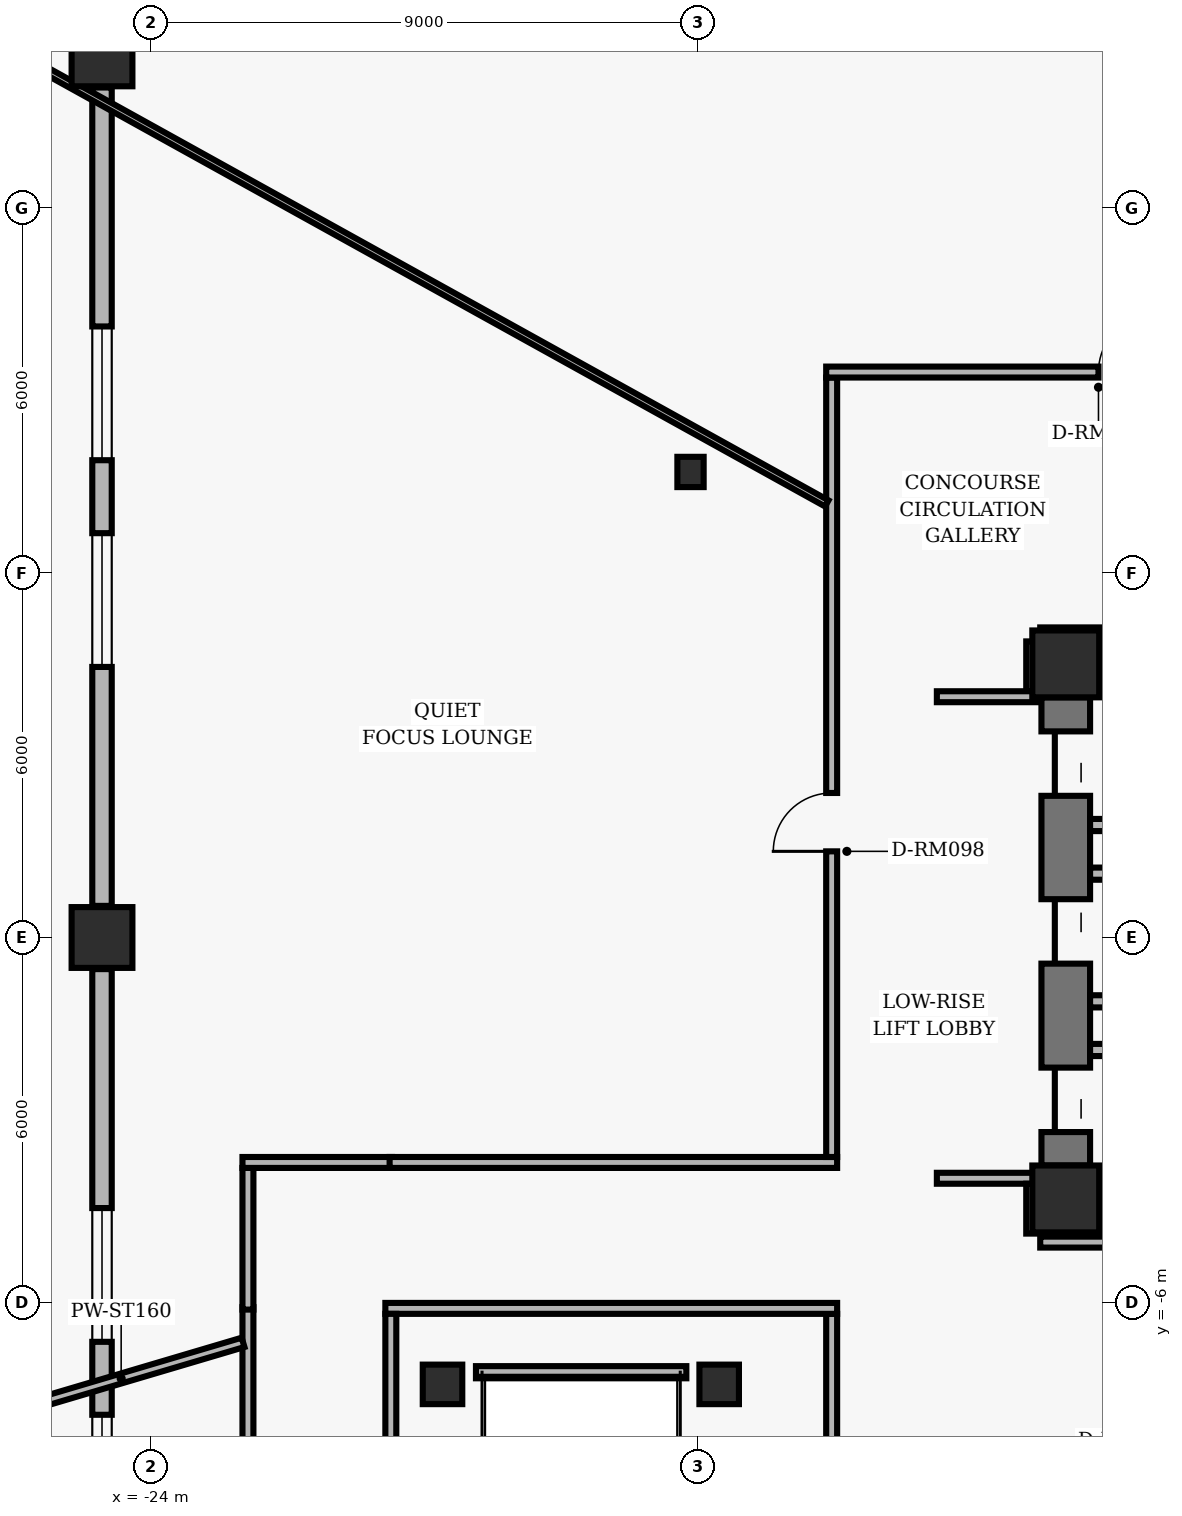
"""IFC4 building model, lengths in metres.
Left out: names, types, materials, properties, quantities, classifications, styles, units other than length and angle.
Written with IfcOpenShell. Run it as: python <this file> out.ifc"""

import sys

from ifc_helpers import new_model, si_unit, direction, frame, frame_2d, origin, origin_2d, place, context, subcontext, project, spatial, rectangle, hollow_rectangle, i_section, extrude, element, fill, save


model = new_model("IFC4")
c1 = context("Model", 3, precision=1e-05, world=origin(), true_north=direction((0.0, 1.0)))
c2 = subcontext(c1, "Body", "Model", "MODEL_VIEW")
j1 = project(units=[si_unit("LENGTHUNIT", "METRE"), si_unit("PLANEANGLEUNIT", "RADIAN")], contexts=[c1])
p1 = place(None, origin())
s1 = spatial("IfcSite", under=j1, at=p1, CompositionType="ELEMENT")
p2 = place(p1, origin())
s2 = spatial("IfcBuilding", under=s1, at=p2, CompositionType="ELEMENT")
p3 = place(p2, frame((0.0, 0.0, 15.36)))
s3 = spatial("IfcBuildingStorey", under=s2, at=p3, CompositionType="ELEMENT", Elevation=15.36)
for number, where, z_axis, x_axis in (
    (1, (-8.95, 4.5, 0.0), (0.0, 0.0, 1.0), (1.0, 0.0, 0.0)),
    (2, (-8.95, -4.3, 0.0), (0.0, 0.0, 1.0), (1.0, 0.0, 0.0)),
):
    element("IfcColumn", number, at=place(p3, frame(where, z_axis=z_axis, x_axis=x_axis)), inside=s3, PredefinedType="COLUMN", context=c2, shape_type="SweptSolid", body=[
        extrude(hollow_rectangle(XDim=1.1, YDim=1.1, WallThickness=0.07, InnerFilletRadius=0.02, OuterFilletRadius=0.04, at=origin_2d()), origin(), (0.0, 0.0, 1.0), 3.52),
    ])
p4 = place(p3, frame((-8.95, -3.75, 0.0), z_axis=(0.0, 0.0, 1.0), x_axis=(0.0, 1.0, 0.0)))
e3 = element("IfcWall", 3, at=p4, inside=s3, PredefinedType="SHEAR", context=c2, shape_type="SweptSolid", body=[
    extrude(rectangle(XDim=7.7, YDim=0.8, at=frame_2d((3.85, 0.0))), origin(), (0.0, 0.0, 1.0), 3.098),
])
p5 = place(p4, frame((0.55, 0.0, 0.0)))
e4 = element("IfcOpeningElement", 4, at=p5, cuts=e3, PredefinedType="OPENING", context=c2, shape_type="SweptSolid", body=[
    extrude(rectangle(XDim=1.06, YDim=2.04, at=frame_2d((0.53, 1.02))), frame((0.0, 0.41, 0.0), z_axis=(0.0, -1.0, 0.0), x_axis=(1.0, 0.0, 0.0)), (0.0, 0.0, 1.0), 0.82),
])
p6 = place(p4, frame((3.32, 0.0, 0.0)))
e5 = element("IfcOpeningElement", 5, at=p6, cuts=e3, PredefinedType="OPENING", context=c2, shape_type="SweptSolid", body=[
    extrude(rectangle(XDim=1.06, YDim=2.04, at=frame_2d((0.53, 1.02))), frame((0.0, 0.41, 0.0), z_axis=(0.0, -1.0, 0.0), x_axis=(1.0, 0.0, 0.0)), (0.0, 0.0, 1.0), 0.82),
])
p7 = place(p4, frame((6.08, 0.0, 0.0)))
e6 = element("IfcOpeningElement", 6, at=p7, cuts=e3, PredefinedType="OPENING", context=c2, shape_type="SweptSolid", body=[
    extrude(rectangle(XDim=1.06, YDim=2.04, at=frame_2d((0.53, 1.02))), frame((0.0, 0.41, 0.0), z_axis=(0.0, -1.0, 0.0), x_axis=(1.0, 0.0, 0.0)), (0.0, 0.0, 1.0), 0.82),
])
for number, where, z_axis, x_axis in (
    (7, (-8.4, 4.5, 0.0), (0.0, 0.0, 1.0), (1.0, 0.0, 0.0)),
    (8, (-8.4, -4.3, 0.0), (0.0, 0.0, 1.0), (1.0, 0.0, 0.0)),
):
    element("IfcWall", number, at=place(p3, frame(where, z_axis=z_axis, x_axis=x_axis)), inside=s3, PredefinedType="SHEAR", context=c2, shape_type="SweptSolid", body=[
        extrude(rectangle(XDim=1.8, YDim=0.4, at=frame_2d((0.9, 0.0))), origin(), (0.0, 0.0, 1.0), 3.098),
    ])
for number, where, z_axis, x_axis in (
    (9, (-24.8, 14.5, 0.0), (0.0, 0.0, 1.0), (1.0, 0.0, 0.0)),
    (10, (-24.8, 0.0, 0.0), (0.0, 0.0, 1.0), (1.0, 0.0, 0.0)),
):
    element("IfcColumn", number, at=place(p3, frame(where, z_axis=z_axis, x_axis=x_axis)), inside=s3, PredefinedType="COLUMN", context=c2, shape_type="SweptSolid", body=[
        extrude(rectangle(XDim=1.0, YDim=1.0, at=origin_2d()), origin(), (0.0, 0.0, 1.0), 3.52),
    ])
for number, where, z_axis, x_axis in (
    (11, (-19.2, -7.35, 0.0), (0.0, 0.0, 1.0), (1.0, 0.0, 0.0)),
    (12, (-14.65, -7.35, 0.0), (0.0, 0.0, 1.0), (1.0, 0.0, 0.0)),
):
    element("IfcColumn", number, at=place(p3, frame(where, z_axis=z_axis, x_axis=x_axis)), inside=s3, PredefinedType="COLUMN", context=c2, shape_type="SweptSolid", body=[
        extrude(rectangle(XDim=0.65, YDim=0.65, at=origin_2d()), origin(), (0.0, 0.0, 1.0), 3.52),
    ])
p8 = place(p3, frame((-15.121, 7.657, 0.0), z_axis=(0.0, 0.0, 1.0), x_axis=(1.0, 0.0, 0.0)))
e13 = element("IfcColumn", 13, at=p8, inside=s3, PredefinedType="COLUMN", context=c2, shape_type="SweptSolid", body=[
    extrude(i_section(OverallWidth=0.432, OverallDepth=0.498, WebThickness=0.056, FlangeThickness=0.089, FilletRadius=0.025, at=origin_2d()), origin(), (0.0, 0.0, 1.0), 3.52),
])
p9 = place(p3, frame((-24.8, 0.52, 0.0), z_axis=(0.0, 0.0, 1.0), x_axis=(0.0, 1.0, 0.0)))
e14 = element("IfcWall", 14, at=p9, inside=s3, PredefinedType="SOLIDWALL", context=c2, shape_type="SweptSolid", body=[
    extrude(rectangle(XDim=13.46, YDim=0.32, at=frame_2d((6.73, 0.0))), origin(), (0.0, 0.0, 1.0), 1.65),
])
p10 = place(p9, frame((3.93, 0.0, 0.4)))
e15 = element("IfcOpeningElement", 15, at=p10, cuts=e14, PredefinedType="OPENING", context=c2, shape_type="SweptSolid", body=[
    extrude(rectangle(XDim=2.2, YDim=1.1, at=frame_2d((1.1, 0.55))), frame((0.0, 0.17, 0.0), z_axis=(0.0, -1.0, 0.0), x_axis=(1.0, 0.0, 0.0)), (0.0, 0.0, 1.0), 0.34),
])
p11 = place(p9, frame((7.33, 0.0, 0.4)))
e16 = element("IfcOpeningElement", 16, at=p11, cuts=e14, PredefinedType="OPENING", context=c2, shape_type="SweptSolid", body=[
    extrude(rectangle(XDim=2.2, YDim=1.1, at=frame_2d((1.1, 0.55))), frame((0.0, 0.17, 0.0), z_axis=(0.0, -1.0, 0.0), x_axis=(1.0, 0.0, 0.0)), (0.0, 0.0, 1.0), 0.34),
])
p12 = place(p3, frame((-24.8, -13.98, 0.0), z_axis=(0.0, 0.0, 1.0), x_axis=(0.0, 1.0, 0.0)))
e17 = element("IfcWall", 17, at=p12, inside=s3, PredefinedType="SOLIDWALL", context=c2, shape_type="SweptSolid", body=[
    extrude(rectangle(XDim=13.46, YDim=0.32, at=frame_2d((6.73, 0.0))), origin(), (0.0, 0.0, 1.0), 1.65),
])
p13 = place(p12, frame((3.93, 0.0, 0.4)))
e18 = element("IfcOpeningElement", 18, at=p13, cuts=e17, PredefinedType="OPENING", context=c2, shape_type="SweptSolid", body=[
    extrude(rectangle(XDim=2.2, YDim=1.1, at=frame_2d((1.1, 0.55))), frame((0.0, 0.17, 0.0), z_axis=(0.0, -1.0, 0.0), x_axis=(1.0, 0.0, 0.0)), (0.0, 0.0, 1.0), 0.34),
])
p14 = place(p12, frame((7.33, 0.0, 0.4)))
e19 = element("IfcOpeningElement", 19, at=p14, cuts=e17, PredefinedType="OPENING", context=c2, shape_type="SweptSolid", body=[
    extrude(rectangle(XDim=2.2, YDim=1.1, at=frame_2d((1.1, 0.55))), frame((0.0, 0.17, 0.0), z_axis=(0.0, -1.0, 0.0), x_axis=(1.0, 0.0, 0.0)), (0.0, 0.0, 1.0), 0.34),
])
for number, where, z_axis, x_axis in (
    (20, (-8.55, -1.85, 0.0), (0.0, 0.0, 1.0), (1.0, 0.0, 0.0)),
    (21, (-8.55, 1.85, 0.0), (0.0, 0.0, 1.0), (1.0, 0.0, 0.0)),
):
    element("IfcWall", number, at=place(p3, frame(where, z_axis=z_axis, x_axis=x_axis)), inside=s3, PredefinedType="PARTITIONING", context=c2, shape_type="SweptSolid", body=[
        extrude(rectangle(XDim=2.1, YDim=0.2, at=frame_2d((1.05, 0.0))), origin(), (0.0, 0.0, 1.0), 3.073),
    ])
for number, where, z_axis, x_axis in (
    (22, (-8.55, -1.05, 0.0), (0.0, 0.0, 1.0), (1.0, 0.0, 0.0)),
    (23, (-8.55, 1.05, 0.0), (0.0, 0.0, 1.0), (1.0, 0.0, 0.0)),
):
    element("IfcWall", number, at=place(p3, frame(where, z_axis=z_axis, x_axis=x_axis)), inside=s3, PredefinedType="PARTITIONING", context=c2, shape_type="SweptSolid", body=[
        extrude(rectangle(XDim=1.91, YDim=0.2, at=frame_2d((0.955, 0.0))), origin(), (0.0, 0.0, 1.0), 3.073),
    ])
p15 = place(p3, frame((-18.65, -7.15, 0.0), z_axis=(0.0, 0.0, 1.0), x_axis=(1.0, 0.0, 0.0)))
e24 = element("IfcWall", 24, at=p15, inside=s3, PredefinedType="PARTITIONING", context=c2, shape_type="SweptSolid", body=[
    extrude(rectangle(XDim=3.46, YDim=0.2, at=frame_2d((1.73, 0.0))), origin(), (0.0, 0.0, 1.0), 3.073),
])
p16 = place(p3, frame((-22.4, -14.82, 0.0), z_axis=(0.0, 0.0, 1.0), x_axis=(0.0, 1.0, 0.0)))
e25 = element("IfcWall", 25, at=p16, inside=s3, PredefinedType="PARTITIONING", context=c2, shape_type="SweptSolid", body=[
    extrude(rectangle(XDim=8.74, YDim=0.18, at=frame_2d((4.37, 0.0))), origin(), (0.0, 0.0, 1.0), 3.073),
])
p17 = place(p3, frame((-22.4, -6.12, 0.0), z_axis=(0.0, 0.0, 1.0), x_axis=(0.0, 1.0, 0.0)))
e26 = element("IfcWall", 26, at=p17, inside=s3, PredefinedType="PARTITIONING", context=c2, shape_type="SweptSolid", body=[
    extrude(rectangle(XDim=2.33, YDim=0.18, at=frame_2d((1.165, 0.0))), origin(), (0.0, 0.0, 1.0), 3.073),
])
p18 = place(p3, frame((-22.49, -3.7, 0.0), z_axis=(0.0, 0.0, 1.0), x_axis=(1.0, 0.0, 0.0)))
e27 = element("IfcWall", 27, at=p18, inside=s3, PredefinedType="PARTITIONING", context=c2, shape_type="SweptSolid", body=[
    extrude(rectangle(XDim=2.46, YDim=0.18, at=frame_2d((1.23, 0.0))), origin(), (0.0, 0.0, 1.0), 3.073),
])
p19 = place(p3, frame((-20.07, -3.7, 0.0), z_axis=(0.0, 0.0, 1.0), x_axis=(1.0, 0.0, 0.0)))
e28 = element("IfcWall", 28, at=p19, inside=s3, PredefinedType="PARTITIONING", context=c2, shape_type="SweptSolid", body=[
    extrude(rectangle(XDim=7.36, YDim=0.18, at=frame_2d((3.68, 0.0))), origin(), (0.0, 0.0, 1.0), 1.893),
])
p20 = place(p3, frame((-12.8, -3.61, 0.0), z_axis=(0.0, 0.0, 1.0), x_axis=(0.0, 1.0, 0.0)))
e29 = element("IfcWall", 29, at=p20, inside=s3, PredefinedType="PARTITIONING", context=c2, shape_type="SweptSolid", body=[
    extrude(rectangle(XDim=12.82, YDim=0.18, at=frame_2d((6.41, 0.0))), origin(), (0.0, 0.0, 1.0), 3.073),
])
p21 = place(p20, frame((5.027, 0.0, 0.0)))
e30 = element("IfcOpeningElement", 30, at=p21, cuts=e29, PredefinedType="OPENING", context=c2, shape_type="SweptSolid", body=[
    extrude(rectangle(XDim=0.96, YDim=2.02, at=frame_2d((0.48, 1.01))), frame((0.0, 0.1, 0.0), z_axis=(0.0, -1.0, 0.0), x_axis=(1.0, 0.0, 0.0)), (0.0, 0.0, 1.0), 0.2),
])
p22 = place(p3, frame((-12.89, 9.3, 0.0), z_axis=(0.0, 0.0, 1.0), x_axis=(1.0, 0.0, 0.0)))
e31 = element("IfcWall", 31, at=p22, inside=s3, PredefinedType="PARTITIONING", context=c2, shape_type="SweptSolid", body=[
    extrude(rectangle(XDim=25.78, YDim=0.18, at=frame_2d((12.89, 0.0))), origin(), (0.0, 0.0, 1.0), 2.587),
])
p23 = place(p22, frame((20.623, 0.0, 0.0)))
e32 = element("IfcOpeningElement", 32, at=p23, cuts=e31, PredefinedType="OPENING", context=c2, shape_type="SweptSolid", body=[
    extrude(rectangle(XDim=0.96, YDim=2.02, at=frame_2d((0.48, 1.01))), frame((0.0, 0.1, 0.0), z_axis=(0.0, -1.0, 0.0), x_axis=(1.0, 0.0, 0.0)), (0.0, 0.0, 1.0), 0.2),
])
p24 = place(p22, frame((12.66, 0.0, 0.0)))
e33 = element("IfcOpeningElement", 33, at=p24, cuts=e31, PredefinedType="OPENING", context=c2, shape_type="SweptSolid", body=[
    extrude(rectangle(XDim=1.02, YDim=2.02, at=frame_2d((0.51, 1.01))), frame((0.0, 0.1, 0.0), z_axis=(0.0, -1.0, 0.0), x_axis=(1.0, 0.0, 0.0)), (0.0, 0.0, 1.0), 0.2),
])
p25 = place(p22, frame((4.478, 0.0, 0.0)))
e34 = element("IfcOpeningElement", 34, at=p25, cuts=e31, PredefinedType="OPENING", context=c2, shape_type="SweptSolid", body=[
    extrude(rectangle(XDim=0.96, YDim=2.02, at=frame_2d((0.48, 1.01))), frame((0.0, 0.1, 0.0), z_axis=(0.0, -1.0, 0.0), x_axis=(1.0, 0.0, 0.0)), (0.0, 0.0, 1.0), 0.2),
])
p26 = place(p3, frame((-12.8, -9.21, 0.0), z_axis=(0.0, 0.0, 1.0), x_axis=(0.0, 1.0, 0.0)))
e35 = element("IfcWall", 35, at=p26, inside=s3, PredefinedType="PARTITIONING", context=c2, shape_type="SweptSolid", body=[
    extrude(rectangle(XDim=3.02, YDim=0.18, at=frame_2d((1.51, 0.0))), origin(), (0.0, 0.0, 1.0), 3.073),
])
p27 = place(p3, frame((-12.71, -6.1, 0.0), z_axis=(0.0, 0.0, 1.0), x_axis=(-1.0, 0.0, 0.0)))
e36 = element("IfcWall", 36, at=p27, inside=s3, PredefinedType="PARTITIONING", context=c2, shape_type="SweptSolid", body=[
    extrude(rectangle(XDim=7.43, YDim=0.18, at=frame_2d((3.715, 0.0))), origin(), (0.0, 0.0, 1.0), 3.073),
])
p28 = place(p3, frame((-20.05, -6.19, 0.0), z_axis=(0.0, 0.0, 1.0), x_axis=(0.0, -1.0, 0.0)))
e37 = element("IfcWall", 37, at=p28, inside=s3, PredefinedType="PARTITIONING", context=c2, shape_type="SweptSolid", body=[
    extrude(rectangle(XDim=8.52, YDim=0.18, at=frame_2d((4.26, 0.0))), origin(), (0.0, 0.0, 1.0), 2.126),
])
p29 = place(p3, frame((-11.07, -3.96, 0.0), z_axis=(0.0, 0.0, 1.0), x_axis=(1.0, 0.0, 0.0)))
e38 = element("IfcWall", 38, at=p29, inside=s3, PredefinedType="PARTITIONING", context=c2, shape_type="SweptSolid", body=[
    extrude(rectangle(XDim=1.65, YDim=0.18, at=frame_2d((0.825, 0.0))), origin(), (0.0, 0.0, 1.0), 1.893),
])
p30 = place(p3, frame((-9.51, -4.05, 0.0), z_axis=(0.0, 0.0, 1.0), x_axis=(0.0, -1.0, 0.0)))
e39 = element("IfcWall", 39, at=p30, inside=s3, PredefinedType="PARTITIONING", context=c2, shape_type="SweptSolid", body=[
    extrude(rectangle(XDim=0.82, YDim=0.18, at=frame_2d((0.41, 0.0))), origin(), (0.0, 0.0, 1.0), 3.073),
])
p31 = place(p3, frame((-9.37, -5.01, 0.0), z_axis=(0.0, 0.0, 1.0), x_axis=(1.0, 0.0, 0.0)))
e40 = element("IfcWall", 40, at=p31, inside=s3, PredefinedType="PARTITIONING", context=c2, shape_type="SweptSolid", body=[
    extrude(rectangle(XDim=3.34, YDim=0.18, at=frame_2d((1.67, 0.0))), origin(), (0.0, 0.0, 1.0), 3.073),
])
p32 = place(p3, frame((-6.562, 5.01, 0.0), z_axis=(0.0, 0.0, 1.0), x_axis=(-1.0, 0.0, 0.0)))
e41 = element("IfcWall", 41, at=p32, inside=s3, PredefinedType="PARTITIONING", context=c2, shape_type="SweptSolid", body=[
    extrude(rectangle(XDim=2.808, YDim=0.18, at=frame_2d((1.404, 0.0))), origin(), (0.0, 0.0, 1.0), 3.073),
])
p33 = place(p3, frame((-9.51, 4.87, 0.0), z_axis=(0.0, 0.0, 1.0), x_axis=(0.0, -1.0, 0.0)))
e42 = element("IfcWall", 42, at=p33, inside=s3, PredefinedType="PARTITIONING", context=c2, shape_type="SweptSolid", body=[
    extrude(rectangle(XDim=0.82, YDim=0.18, at=frame_2d((0.41, 0.0))), origin(), (0.0, 0.0, 1.0), 3.073),
])
p34 = place(p3, frame((-9.42, 3.96, 0.0), z_axis=(0.0, 0.0, 1.0), x_axis=(-1.0, 0.0, 0.0)))
e43 = element("IfcWall", 43, at=p34, inside=s3, PredefinedType="PARTITIONING", context=c2, shape_type="SweptSolid", body=[
    extrude(rectangle(XDim=1.65, YDim=0.18, at=frame_2d((0.825, 0.0))), origin(), (0.0, 0.0, 1.0), 3.073),
])
p35 = place(p3, frame((-22.48, -6.659, 0.0), z_axis=(0.0, 0.0, 1.0), x_axis=(-0.958824609588, -0.283998887406, 0.0)))
e44 = element("IfcWall", 44, at=p35, inside=s3, PredefinedType="PARTITIONING", context=c2, shape_type="SweptSolid", body=[
    extrude(rectangle(XDim=4.182, YDim=0.16, at=frame_2d((2.091, 0.0))), origin(), (0.0, 0.0, 1.0), 3.073),
])
p36 = place(p3, frame((-3.23, 9.38, 0.0), z_axis=(0.0, 0.0, 1.0), x_axis=(-0.325566886221, 0.945519012287, 0.0)))
e45 = element("IfcWall", 45, at=p36, inside=s3, PredefinedType="PARTITIONING", context=c2, shape_type="SweptSolid", body=[
    extrude(rectangle(XDim=18.572, YDim=0.16, at=frame_2d((9.286, 0.0))), origin(), (0.0, 0.0, 1.0), 1.893),
])
p37 = place(p3, frame((-12.88, 7.139, 0.0), z_axis=(0.0, 0.0, 1.0), x_axis=(-0.874620150807, 0.484808819848, 0.0)))
e46 = element("IfcWall", 46, at=p37, inside=s3, PredefinedType="MOVABLE", context=c2, shape_type="SweptSolid", body=[
    extrude(rectangle(XDim=15.561, YDim=0.115, at=frame_2d((7.781, 0.0))), origin(), (0.0, 0.0, 1.0), 1.893),
])
p38 = place(p10, origin())
e47 = element("IfcWindow", 47, at=p38, inside=s3, PartitioningType="SINGLE_PANEL", PredefinedType="WINDOW", context=c2, shape_type="SweptSolid", body=[
    extrude(rectangle(XDim=2.2, YDim=1.1, at=frame_2d((1.1, 0.55))), frame((0.0, 0.03, 0.0), z_axis=(0.0, -1.0, 0.0), x_axis=(1.0, 0.0, 0.0)), (0.0, 0.0, 1.0), 0.06),
])
fill(e15, e47)
p39 = place(p11, origin())
e48 = element("IfcWindow", 48, at=p39, inside=s3, PartitioningType="SINGLE_PANEL", PredefinedType="WINDOW", context=c2, shape_type="SweptSolid", body=[
    extrude(rectangle(XDim=2.2, YDim=1.1, at=frame_2d((1.1, 0.55))), frame((0.0, 0.03, 0.0), z_axis=(0.0, -1.0, 0.0), x_axis=(1.0, 0.0, 0.0)), (0.0, 0.0, 1.0), 0.06),
])
fill(e16, e48)
p40 = place(p13, origin())
e49 = element("IfcWindow", 49, at=p40, inside=s3, PartitioningType="SINGLE_PANEL", PredefinedType="WINDOW", context=c2, shape_type="SweptSolid", body=[
    extrude(rectangle(XDim=2.2, YDim=1.1, at=frame_2d((1.1, 0.55))), frame((0.0, 0.03, 0.0), z_axis=(0.0, -1.0, 0.0), x_axis=(1.0, 0.0, 0.0)), (0.0, 0.0, 1.0), 0.06),
])
fill(e18, e49)
p41 = place(p14, origin())
e50 = element("IfcWindow", 50, at=p41, inside=s3, PartitioningType="SINGLE_PANEL", PredefinedType="WINDOW", context=c2, shape_type="SweptSolid", body=[
    extrude(rectangle(XDim=2.2, YDim=1.1, at=frame_2d((1.1, 0.55))), frame((0.0, 0.03, 0.0), z_axis=(0.0, -1.0, 0.0), x_axis=(1.0, 0.0, 0.0)), (0.0, 0.0, 1.0), 0.06),
])
fill(e19, e50)
p42 = place(p5, origin())
e51 = element("IfcDoor", 51, at=p42, inside=s3, OperationType="SLIDING_TO_LEFT", PredefinedType="DOOR", context=c2, shape_type="SweptSolid", body=[
    extrude(rectangle(XDim=1.06, YDim=2.04, at=frame_2d((0.53, 1.02))), frame((0.0, 0.025, 0.0), z_axis=(0.0, -1.0, 0.0), x_axis=(1.0, 0.0, 0.0)), (0.0, 0.0, 1.0), 0.05),
])
fill(e4, e51)
p43 = place(p6, origin())
e52 = element("IfcDoor", 52, at=p43, inside=s3, OperationType="SLIDING_TO_RIGHT", PredefinedType="DOOR", context=c2, shape_type="SweptSolid", body=[
    extrude(rectangle(XDim=1.06, YDim=2.04, at=frame_2d((0.53, 1.02))), frame((0.0, 0.025, 0.0), z_axis=(0.0, -1.0, 0.0), x_axis=(1.0, 0.0, 0.0)), (0.0, 0.0, 1.0), 0.05),
])
fill(e5, e52)
p44 = place(p7, origin())
e53 = element("IfcDoor", 53, at=p44, inside=s3, OperationType="SLIDING_TO_LEFT", PredefinedType="DOOR", context=c2, shape_type="SweptSolid", body=[
    extrude(rectangle(XDim=1.06, YDim=2.04, at=frame_2d((0.53, 1.02))), frame((0.0, 0.025, 0.0), z_axis=(0.0, -1.0, 0.0), x_axis=(1.0, 0.0, 0.0)), (0.0, 0.0, 1.0), 0.05),
])
fill(e6, e53)
p45 = place(p25, origin())
e54 = element("IfcDoor", 54, at=p45, inside=s3, OperationType="SINGLE_SWING_RIGHT", PredefinedType="DOOR", context=c2, shape_type="SweptSolid", body=[
    extrude(rectangle(XDim=0.96, YDim=2.02, at=frame_2d((0.48, 1.01))), frame((0.0, 0.025, 0.0), z_axis=(0.0, -1.0, 0.0), x_axis=(1.0, 0.0, 0.0)), (0.0, 0.0, 1.0), 0.05),
])
fill(e34, e54)
p46 = place(p21, origin())
e55 = element("IfcDoor", 55, at=p46, inside=s3, OperationType="SINGLE_SWING_LEFT", PredefinedType="DOOR", context=c2, shape_type="SweptSolid", body=[
    extrude(rectangle(XDim=0.96, YDim=2.02, at=frame_2d((0.48, 1.01))), frame((0.0, 0.025, 0.0), z_axis=(0.0, -1.0, 0.0), x_axis=(1.0, 0.0, 0.0)), (0.0, 0.0, 1.0), 0.05),
])
fill(e30, e55)
save(model, sys.argv[1])
